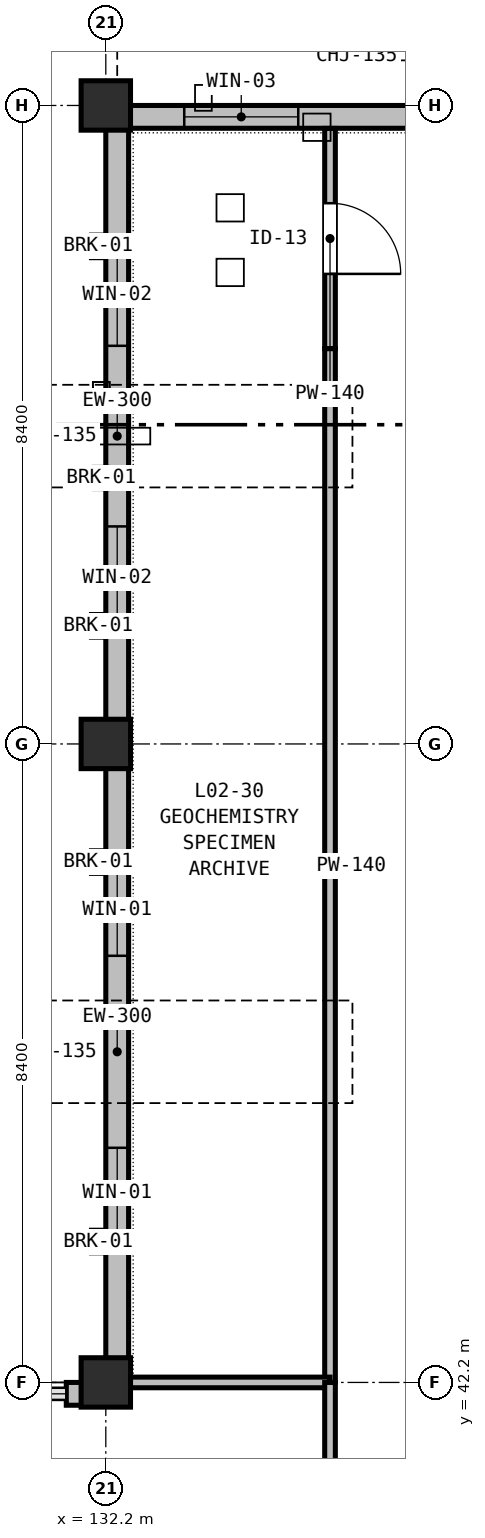
"""IFC4 building model, lengths in metres.
Left out: names, types, materials, properties, quantities, classifications, styles, units other than length and angle.
Written with IfcOpenShell. Run it as: python <this file> out.ifc"""

import sys

from ifc_helpers import new_model, si_unit, direction, frame, frame_2d, origin, origin_2d, place, context, subcontext, project, spatial, rectangle, extrude, element, fill, save


model = new_model("IFC4")
c1 = context("Model", 3, precision=1e-05, world=origin(), true_north=direction((0.0, 1.0)))
c2 = subcontext(c1, "Body", "Model", "MODEL_VIEW")
j1 = project(units=[si_unit("LENGTHUNIT", "METRE"), si_unit("PLANEANGLEUNIT", "RADIAN")], contexts=[c1])
p1 = place(None, origin())
s1 = spatial("IfcSite", under=j1, at=p1, CompositionType="ELEMENT")
p2 = place(p1, origin())
s2 = spatial("IfcBuilding", under=s1, at=p2, CompositionType="ELEMENT")
p3 = place(p2, frame((0.0, 0.0, 10.2)))
s3 = spatial("IfcBuildingStorey", under=s2, at=p3, CompositionType="ELEMENT", Elevation=10.2)
p4 = place(p3, frame((132.2, 42.2, 0.0), z_axis=(0.0, 0.0, 1.0), x_axis=(1.0, 0.0, 0.0)))
e1 = element("IfcColumn", 1, at=p4, inside=s3, PredefinedType="COLUMN", context=c2, shape_type="SweptSolid", body=[
    extrude(rectangle(XDim=0.65, YDim=0.65, at=origin_2d()), origin(), (0.0, 0.0, 1.0), 4.8),
])
for number, where, z_axis, x_axis in (
    (2, (132.2, 50.6, 0.0), (0.0, 0.0, 1.0), (1.0, 0.0, 0.0)),
    (3, (132.2, 59.0, 0.0), (0.0, 0.0, 1.0), (1.0, 0.0, 0.0)),
):
    element("IfcColumn", number, at=place(p3, frame(where, z_axis=z_axis, x_axis=x_axis)), inside=s3, PredefinedType="COLUMN", context=c2, shape_type="SweptSolid", body=[
        extrude(rectangle(XDim=0.65, YDim=0.65, at=origin_2d()), origin(), (0.0, 0.0, 1.0), 4.74),
    ])
p5 = place(p3, frame((131.68, 42.05, 0.0), z_axis=(0.0, 0.0, 1.0), x_axis=(1.0, 0.0, 0.0)))
e4 = element("IfcWall", 4, at=p5, inside=s3, PredefinedType="STANDARD", context=c2, shape_type="SweptSolid", body=[
    extrude(rectangle(XDim=0.52, YDim=0.3, at=frame_2d((0.26, 0.0))), origin(), (0.0, 0.0, 1.0), 3.935),
])
p6 = place(p3, frame((132.35, 42.5, 0.0), z_axis=(0.0, 0.0, 1.0), x_axis=(0.0, 1.0, 0.0)))
e5 = element("IfcWall", 5, at=p6, inside=s3, PredefinedType="STANDARD", context=c2, shape_type="SweptSolid", body=[
    extrude(rectangle(XDim=8.1, YDim=0.3, at=frame_2d((4.05, 0.0))), origin(), (0.0, 0.0, 1.0), 4.085),
])
p7 = place(p6, frame((1.587, 0.0, 0.9)))
e6 = element("IfcOpeningElement", 6, at=p7, cuts=e5, PredefinedType="OPENING", context=c2, shape_type="SweptSolid", body=[
    extrude(rectangle(XDim=1.2, YDim=2.1, at=frame_2d((0.6, 1.05))), frame((0.0, 0.16, 0.0), z_axis=(0.0, -1.0, 0.0), x_axis=(1.0, 0.0, 0.0)), (0.0, 0.0, 1.0), 0.32),
])
p8 = place(p6, frame((5.313, 0.0, 0.9)))
e7 = element("IfcOpeningElement", 7, at=p8, cuts=e5, PredefinedType="OPENING", context=c2, shape_type="SweptSolid", body=[
    extrude(rectangle(XDim=1.2, YDim=2.1, at=frame_2d((0.6, 1.05))), frame((0.0, 0.16, 0.0), z_axis=(0.0, -1.0, 0.0), x_axis=(1.0, 0.0, 0.0)), (0.0, 0.0, 1.0), 0.32),
])
p9 = place(p3, frame((132.35, 50.6, 0.0), z_axis=(0.0, 0.0, 1.0), x_axis=(0.0, 1.0, 0.0)))
e8 = element("IfcWall", 8, at=p9, inside=s3, PredefinedType="STANDARD", context=c2, shape_type="SweptSolid", body=[
    extrude(rectangle(XDim=8.1, YDim=0.3, at=frame_2d((4.05, 0.0))), origin(), (0.0, 0.0, 1.0), 4.085),
])
p10 = place(p9, frame((1.512, 0.0, 0.9)))
e9 = element("IfcOpeningElement", 9, at=p10, cuts=e8, PredefinedType="OPENING", context=c2, shape_type="SweptSolid", body=[
    extrude(rectangle(XDim=1.35, YDim=2.1, at=frame_2d((0.675, 1.05))), frame((0.0, 0.16, 0.0), z_axis=(0.0, -1.0, 0.0), x_axis=(1.0, 0.0, 0.0)), (0.0, 0.0, 1.0), 0.32),
])
p11 = place(p9, frame((5.238, 0.0, 0.9)))
e10 = element("IfcOpeningElement", 10, at=p11, cuts=e8, PredefinedType="OPENING", context=c2, shape_type="SweptSolid", body=[
    extrude(rectangle(XDim=1.35, YDim=2.1, at=frame_2d((0.675, 1.05))), frame((0.0, 0.16, 0.0), z_axis=(0.0, -1.0, 0.0), x_axis=(1.0, 0.0, 0.0)), (0.0, 0.0, 1.0), 0.32),
])
p12 = place(p3, frame((132.2, 58.85, 0.0), z_axis=(0.0, 0.0, 1.0), x_axis=(1.0, 0.0, 0.0)))
e11 = element("IfcWall", 11, at=p12, inside=s3, PredefinedType="STANDARD", context=c2, shape_type="SweptSolid", body=[
    extrude(rectangle(XDim=6.6, YDim=0.3, at=frame_2d((3.3, 0.0))), origin(), (0.0, 0.0, 1.0), 3.935),
])
p13 = place(p12, frame((1.032, 0.0, 0.9)))
e12 = element("IfcOpeningElement", 12, at=p13, cuts=e11, PredefinedType="OPENING", context=c2, shape_type="SweptSolid", body=[
    extrude(rectangle(XDim=1.5, YDim=2.1, at=frame_2d((0.75, 1.05))), frame((0.0, 0.16, 0.0), z_axis=(0.0, -1.0, 0.0), x_axis=(1.0, 0.0, 0.0)), (0.0, 0.0, 1.0), 0.32),
])
p14 = place(p12, frame((4.068, 0.0, 0.9)))
e13 = element("IfcOpeningElement", 13, at=p14, cuts=e11, PredefinedType="OPENING", context=c2, shape_type="SweptSolid", body=[
    extrude(rectangle(XDim=1.5, YDim=2.1, at=frame_2d((0.75, 1.05))), frame((0.0, 0.16, 0.0), z_axis=(0.0, -1.0, 0.0), x_axis=(1.0, 0.0, 0.0)), (0.0, 0.0, 1.0), 0.32),
])
p15 = place(p3, frame((135.15, 58.698, 0.0), z_axis=(0.0, 0.0, 1.0), x_axis=(0.0, -1.0, 0.0)))
e14 = element("IfcWall", 14, at=p15, inside=s3, PredefinedType="PARTITIONING", context=c2, shape_type="SweptSolid", body=[
    extrude(rectangle(XDim=2.898, YDim=0.14, at=frame_2d((1.449, 0.0))), origin(), (0.0, 0.0, 1.0), 4.085),
])
p16 = place(p15, frame((0.984, 0.0, 0.0)))
e15 = element("IfcOpeningElement", 15, at=p16, cuts=e14, PredefinedType="OPENING", context=c2, shape_type="SweptSolid", body=[
    extrude(rectangle(XDim=0.93, YDim=2.1, at=frame_2d((0.465, 1.05))), frame((0.0, 0.08, 0.0), z_axis=(0.0, -1.0, 0.0), x_axis=(1.0, 0.0, 0.0)), (0.0, 0.0, 1.0), 0.16),
])
p17 = place(p3, frame((135.15, 55.8, 0.0), z_axis=(0.0, 0.0, 1.0), x_axis=(0.0, -1.0, 0.0)))
e16 = element("IfcWall", 16, at=p17, inside=s3, PredefinedType="PARTITIONING", context=c2, shape_type="SweptSolid", body=[
    extrude(rectangle(XDim=13.6, YDim=0.14, at=frame_2d((6.8, 0.0))), origin(), (0.0, 0.0, 1.0), 4.135),
])
p18 = place(p3, frame((135.15, 42.2, 0.0), z_axis=(0.0, 0.0, 1.0), x_axis=(-1.0, 0.0, 0.0)))
e17 = element("IfcWall", 17, at=p18, inside=s3, PredefinedType="PARTITIONING", context=c2, shape_type="SweptSolid", body=[
    extrude(rectangle(XDim=2.625, YDim=0.14, at=frame_2d((1.312, 0.0))), origin(), (0.0, 0.0, 1.0), 4.135),
])
p19 = place(p3, frame((135.15, 42.2, 0.0), z_axis=(0.0, 0.0, 1.0), x_axis=(0.0, -1.0, 0.0)))
e18 = element("IfcWall", 18, at=p19, inside=s3, PredefinedType="PARTITIONING", context=c2, shape_type="SweptSolid", body=[
    extrude(rectangle(XDim=8.4, YDim=0.14, at=frame_2d((4.2, 0.0))), origin(), (0.0, 0.0, 1.0), 4.135),
])
p20 = place(p19, frame((3.62, 0.0, 0.0)))
e19 = element("IfcOpeningElement", 19, at=p20, cuts=e18, PredefinedType="OPENING", context=c2, shape_type="SweptSolid", body=[
    extrude(rectangle(XDim=1.16, YDim=2.14, at=frame_2d((0.58, 1.07))), frame((0.0, 0.08, 0.0), z_axis=(0.0, -1.0, 0.0), x_axis=(1.0, 0.0, 0.0)), (0.0, 0.0, 1.0), 0.16),
])
p21 = place(p7, origin())
e20 = element("IfcWindow", 20, at=p21, inside=s3, PartitioningType="SINGLE_PANEL", PredefinedType="WINDOW", context=c2, shape_type="SweptSolid", body=[
    extrude(rectangle(XDim=1.2, YDim=2.1, at=frame_2d((0.6, 1.05))), frame((0.0, 0.03, 0.0), z_axis=(0.0, -1.0, 0.0), x_axis=(1.0, 0.0, 0.0)), (0.0, 0.0, 1.0), 0.06),
])
fill(e6, e20)
p22 = place(p8, origin())
e21 = element("IfcWindow", 21, at=p22, inside=s3, PartitioningType="SINGLE_PANEL", PredefinedType="WINDOW", context=c2, shape_type="SweptSolid", body=[
    extrude(rectangle(XDim=1.2, YDim=2.1, at=frame_2d((0.6, 1.05))), frame((0.0, 0.03, 0.0), z_axis=(0.0, -1.0, 0.0), x_axis=(1.0, 0.0, 0.0)), (0.0, 0.0, 1.0), 0.06),
])
fill(e7, e21)
p23 = place(p10, origin())
e22 = element("IfcWindow", 22, at=p23, inside=s3, PartitioningType="SINGLE_PANEL", PredefinedType="WINDOW", context=c2, shape_type="SweptSolid", body=[
    extrude(rectangle(XDim=1.35, YDim=2.1, at=frame_2d((0.675, 1.05))), frame((0.0, 0.03, 0.0), z_axis=(0.0, -1.0, 0.0), x_axis=(1.0, 0.0, 0.0)), (0.0, 0.0, 1.0), 0.06),
])
fill(e9, e22)
p24 = place(p11, origin())
e23 = element("IfcWindow", 23, at=p24, inside=s3, PartitioningType="SINGLE_PANEL", PredefinedType="WINDOW", context=c2, shape_type="SweptSolid", body=[
    extrude(rectangle(XDim=1.35, YDim=2.1, at=frame_2d((0.675, 1.05))), frame((0.0, 0.03, 0.0), z_axis=(0.0, -1.0, 0.0), x_axis=(1.0, 0.0, 0.0)), (0.0, 0.0, 1.0), 0.06),
])
fill(e10, e23)
p25 = place(p13, origin())
e24 = element("IfcWindow", 24, at=p25, inside=s3, PartitioningType="SINGLE_PANEL", PredefinedType="WINDOW", context=c2, shape_type="SweptSolid", body=[
    extrude(rectangle(XDim=1.5, YDim=2.1, at=frame_2d((0.75, 1.05))), frame((0.0, 0.03, 0.0), z_axis=(0.0, -1.0, 0.0), x_axis=(1.0, 0.0, 0.0)), (0.0, 0.0, 1.0), 0.06),
])
fill(e12, e24)
p26 = place(p16, origin())
e25 = element("IfcDoor", 25, at=p26, inside=s3, OperationType="SINGLE_SWING_RIGHT", PredefinedType="DOOR", context=c2, shape_type="SweptSolid", body=[
    extrude(rectangle(XDim=0.93, YDim=2.1, at=frame_2d((0.465, 1.05))), frame((0.0, 0.025, 0.0), z_axis=(0.0, -1.0, 0.0), x_axis=(1.0, 0.0, 0.0)), (0.0, 0.0, 1.0), 0.05),
])
fill(e15, e25)
save(model, sys.argv[1])
